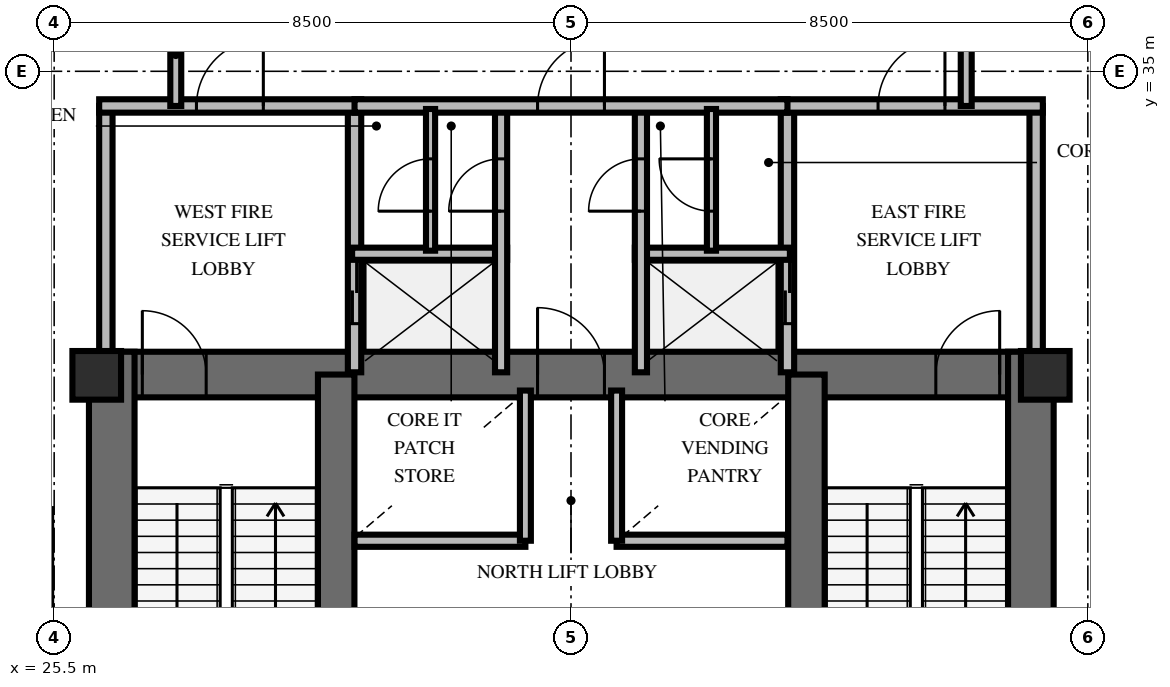
"""IFC4 building model, lengths in metres.
Left out: names, types, materials, properties, quantities, classifications, styles, units other than length and angle.
Written with IfcOpenShell. Run it as: python <this file> out.ifc"""

import sys

from ifc_helpers import new_model, si_unit, direction, frame, frame_2d, origin, origin_2d, place, context, subcontext, project, spatial, rectangle, extrude, element, fill, save


model = new_model("IFC4")
c1 = context("Model", 3, precision=1e-05, world=origin(), true_north=direction((0.0, 1.0)))
c2 = subcontext(c1, "Body", "Model", "MODEL_VIEW")
j1 = project(units=[si_unit("LENGTHUNIT", "METRE"), si_unit("PLANEANGLEUNIT", "RADIAN")], contexts=[c1])
p1 = place(None, origin())
s1 = spatial("IfcSite", under=j1, at=p1, CompositionType="ELEMENT")
p2 = place(p1, origin())
s2 = spatial("IfcBuilding", under=s1, at=p2, CompositionType="ELEMENT")
p3 = place(p2, frame((0.0, 0.0, 125.8)))
s3 = spatial("IfcBuildingStorey", under=s2, at=p3, CompositionType="ELEMENT", Elevation=125.8)
p4 = place(p3, frame((26.072, 30.013, 0.0), z_axis=(0.0, 0.0, 1.0), x_axis=(1.0, 0.0, 0.0)))
e1 = element("IfcWall", 1, at=p4, inside=s3, PredefinedType="SHEAR", context=c2, shape_type="SweptSolid", body=[
    extrude(rectangle(XDim=15.866, YDim=0.75, at=frame_2d((7.933, 0.0))), origin(), (0.0, 0.0, 1.0), 4.0),
])
p5 = place(p4, frame((0.878, 0.0, 0.0)))
e2 = element("IfcOpeningElement", 2, at=p5, cuts=e1, PredefinedType="OPENING", context=c2, shape_type="SweptSolid", body=[
    extrude(rectangle(XDim=1.05, YDim=2.15, at=frame_2d((0.525, 1.075))), frame((0.0, 0.385, 0.0), z_axis=(0.0, -1.0, 0.0), x_axis=(1.0, 0.0, 0.0)), (0.0, 0.0, 1.0), 0.77),
])
p6 = place(p4, frame((13.928, 0.0, 0.0)))
e3 = element("IfcOpeningElement", 3, at=p6, cuts=e1, PredefinedType="OPENING", context=c2, shape_type="SweptSolid", body=[
    extrude(rectangle(XDim=1.05, YDim=2.15, at=frame_2d((0.525, 1.075))), frame((0.0, 0.385, 0.0), z_axis=(0.0, -1.0, 0.0), x_axis=(1.0, 0.0, 0.0)), (0.0, 0.0, 1.0), 0.77),
])
p7 = place(p4, frame((7.378, 0.0, 0.0)))
e4 = element("IfcOpeningElement", 4, at=p7, cuts=e1, PredefinedType="OPENING", context=c2, shape_type="SweptSolid", body=[
    extrude(rectangle(XDim=1.1, YDim=2.15, at=frame_2d((0.55, 1.075))), frame((0.0, 0.385, 0.0), z_axis=(0.0, -1.0, 0.0), x_axis=(1.0, 0.0, 0.0)), (0.0, 0.0, 1.0), 0.77),
])
for number, where, z_axis, x_axis in (
    (5, (26.447, 19.812, 0.0), (0.0, 0.0, 1.0), (0.0, 1.0, 0.0)),
    (6, (41.563, 19.812, 0.0), (0.0, 0.0, 1.0), (0.0, 1.0, 0.0)),
):
    element("IfcWall", number, at=place(p3, frame(where, z_axis=z_axis, x_axis=x_axis)), inside=s3, PredefinedType="SHEAR", context=c2, shape_type="SweptSolid", body=[
        extrude(rectangle(XDim=10.576, YDim=0.75, at=frame_2d((5.288, 0.0))), origin(), (0.0, 0.0, 1.0), 4.0),
    ])
for number, where, z_axis, x_axis in (
    (7, (30.138, 20.187, 0.0), (0.0, 0.0, 1.0), (0.0, 1.0, 0.0)),
    (8, (37.872, 20.187, 0.0), (0.0, 0.0, 1.0), (0.0, 1.0, 0.0)),
):
    element("IfcWall", number, at=place(p3, frame(where, z_axis=z_axis, x_axis=x_axis)), inside=s3, PredefinedType="SHEAR", context=c2, shape_type="SweptSolid", body=[
        extrude(rectangle(XDim=9.826, YDim=0.6, at=frame_2d((4.913, 0.0))), origin(), (0.0, 0.0, 1.0), 4.0),
    ])
for number, where, z_axis, x_axis in (
    (9, (26.2, 30.0, 0.0), (0.0, 0.0, 1.0), (1.0, 0.0, 0.0)),
    (10, (41.8, 30.0, 0.0), (0.0, 0.0, 1.0), (1.0, 0.0, 0.0)),
):
    element("IfcColumn", number, at=place(p3, frame(where, z_axis=z_axis, x_axis=x_axis)), inside=s3, PredefinedType="PILASTER", context=c2, shape_type="SweptSolid", body=[
        extrude(rectangle(XDim=0.8, YDim=0.8, at=origin_2d()), origin(), (0.0, 0.0, 1.0), 4.0),
    ])
p8 = place(p3, frame((26.35, 30.05, 0.0), z_axis=(0.0, 0.0, 1.0), x_axis=(0.0, 1.0, 0.0)))
e11 = element("IfcWall", 11, at=p8, inside=s3, PredefinedType="SOLIDWALL", context=c2, shape_type="SweptSolid", body=[
    extrude(rectangle(XDim=4.38, YDim=0.22, at=frame_2d((2.19, 0.0))), origin(), (0.0, 0.0, 1.0), 2.8),
])
p9 = place(p3, frame((30.44, 30.05, 0.0), z_axis=(0.0, 0.0, 1.0), x_axis=(0.0, 1.0, 0.0)))
e12 = element("IfcWall", 12, at=p9, inside=s3, PredefinedType="SOLIDWALL", context=c2, shape_type="SweptSolid", body=[
    extrude(rectangle(XDim=4.38, YDim=0.22, at=frame_2d((2.19, 0.0))), origin(), (0.0, 0.0, 1.0), 2.8),
])
p10 = place(p9, frame((0.8, 0.0, 0.0)))
e13 = element("IfcOpeningElement", 13, at=p10, cuts=e12, PredefinedType="OPENING", context=c2, shape_type="SweptSolid", body=[
    extrude(rectangle(XDim=1.05, YDim=2.1, at=frame_2d((0.525, 1.05))), frame((0.0, 0.12, 0.0), z_axis=(0.0, -1.0, 0.0), x_axis=(1.0, 0.0, 0.0)), (0.0, 0.0, 1.0), 0.24),
])
p11 = place(p3, frame((26.24, 34.43, 0.0), z_axis=(0.0, 0.0, 1.0), x_axis=(1.0, 0.0, 0.0)))
e14 = element("IfcWall", 14, at=p11, inside=s3, PredefinedType="SOLIDWALL", context=c2, shape_type="SweptSolid", body=[
    extrude(rectangle(XDim=4.31, YDim=0.22, at=frame_2d((2.155, 0.0))), origin(), (0.0, 0.0, 1.0), 2.8),
])
p12 = place(p11, frame((1.6, 0.0, 0.0)))
e15 = element("IfcOpeningElement", 15, at=p12, cuts=e14, PredefinedType="OPENING", context=c2, shape_type="SweptSolid", body=[
    extrude(rectangle(XDim=1.1, YDim=2.15, at=frame_2d((0.55, 1.075))), frame((0.0, 0.12, 0.0), z_axis=(0.0, -1.0, 0.0), x_axis=(1.0, 0.0, 0.0)), (0.0, 0.0, 1.0), 0.24),
])
p13 = place(p3, frame((30.4, 32.0, 0.0), z_axis=(0.0, 0.0, 1.0), x_axis=(1.0, 0.0, 0.0)))
e16 = element("IfcWall", 16, at=p13, inside=s3, PredefinedType="SOLIDWALL", context=c2, shape_type="SweptSolid", body=[
    extrude(rectangle(XDim=2.55, YDim=0.2, at=frame_2d((1.275, 0.0))), origin(), (0.0, 0.0, 1.0), 2.8),
])
p14 = place(p3, frame((32.85, 30.05, 0.0), z_axis=(0.0, 0.0, 1.0), x_axis=(0.0, 1.0, 0.0)))
e17 = element("IfcWall", 17, at=p14, inside=s3, PredefinedType="SOLIDWALL", context=c2, shape_type="SweptSolid", body=[
    extrude(rectangle(XDim=4.38, YDim=0.2, at=frame_2d((2.19, 0.0))), origin(), (0.0, 0.0, 1.0), 2.8),
])
p15 = place(p14, frame((2.65, 0.0, 0.0)))
e18 = element("IfcOpeningElement", 18, at=p15, cuts=e17, PredefinedType="OPENING", context=c2, shape_type="SweptSolid", body=[
    extrude(rectangle(XDim=0.86, YDim=2.05, at=frame_2d((0.43, 1.025))), frame((0.0, 0.11, 0.0), z_axis=(0.0, -1.0, 0.0), x_axis=(1.0, 0.0, 0.0)), (0.0, 0.0, 1.0), 0.22),
])
p16 = place(p3, frame((37.56, 30.05, 0.0), z_axis=(0.0, 0.0, 1.0), x_axis=(0.0, 1.0, 0.0)))
e19 = element("IfcWall", 19, at=p16, inside=s3, PredefinedType="SOLIDWALL", context=c2, shape_type="SweptSolid", body=[
    extrude(rectangle(XDim=4.38, YDim=0.22, at=frame_2d((2.19, 0.0))), origin(), (0.0, 0.0, 1.0), 2.8),
])
p17 = place(p16, frame((0.8, 0.0, 0.0)))
e20 = element("IfcOpeningElement", 20, at=p17, cuts=e19, PredefinedType="OPENING", context=c2, shape_type="SweptSolid", body=[
    extrude(rectangle(XDim=1.05, YDim=2.1, at=frame_2d((0.525, 1.05))), frame((0.0, 0.12, 0.0), z_axis=(0.0, -1.0, 0.0), x_axis=(1.0, 0.0, 0.0)), (0.0, 0.0, 1.0), 0.24),
])
p18 = place(p3, frame((41.65, 30.05, 0.0), z_axis=(0.0, 0.0, 1.0), x_axis=(0.0, 1.0, 0.0)))
e21 = element("IfcWall", 21, at=p18, inside=s3, PredefinedType="SOLIDWALL", context=c2, shape_type="SweptSolid", body=[
    extrude(rectangle(XDim=4.38, YDim=0.22, at=frame_2d((2.19, 0.0))), origin(), (0.0, 0.0, 1.0), 2.8),
])
p19 = place(p3, frame((37.45, 34.43, 0.0), z_axis=(0.0, 0.0, 1.0), x_axis=(1.0, 0.0, 0.0)))
e22 = element("IfcWall", 22, at=p19, inside=s3, PredefinedType="SOLIDWALL", context=c2, shape_type="SweptSolid", body=[
    extrude(rectangle(XDim=4.31, YDim=0.22, at=frame_2d((2.155, 0.0))), origin(), (0.0, 0.0, 1.0), 2.8),
])
p20 = place(p19, frame((1.6, 0.0, 0.0)))
e23 = element("IfcOpeningElement", 23, at=p20, cuts=e22, PredefinedType="OPENING", context=c2, shape_type="SweptSolid", body=[
    extrude(rectangle(XDim=1.1, YDim=2.15, at=frame_2d((0.55, 1.075))), frame((0.0, 0.12, 0.0), z_axis=(0.0, -1.0, 0.0), x_axis=(1.0, 0.0, 0.0)), (0.0, 0.0, 1.0), 0.24),
])
p21 = place(p3, frame((35.05, 32.0, 0.0), z_axis=(0.0, 0.0, 1.0), x_axis=(1.0, 0.0, 0.0)))
e24 = element("IfcWall", 24, at=p21, inside=s3, PredefinedType="SOLIDWALL", context=c2, shape_type="SweptSolid", body=[
    extrude(rectangle(XDim=2.55, YDim=0.2, at=frame_2d((1.275, 0.0))), origin(), (0.0, 0.0, 1.0), 2.8),
])
p22 = place(p3, frame((35.15, 30.05, 0.0), z_axis=(0.0, 0.0, 1.0), x_axis=(0.0, 1.0, 0.0)))
e25 = element("IfcWall", 25, at=p22, inside=s3, PredefinedType="SOLIDWALL", context=c2, shape_type="SweptSolid", body=[
    extrude(rectangle(XDim=4.38, YDim=0.2, at=frame_2d((2.19, 0.0))), origin(), (0.0, 0.0, 1.0), 2.8),
])
p23 = place(p22, frame((2.65, 0.0, 0.0)))
e26 = element("IfcOpeningElement", 26, at=p23, cuts=e25, PredefinedType="OPENING", context=c2, shape_type="SweptSolid", body=[
    extrude(rectangle(XDim=0.86, YDim=2.05, at=frame_2d((0.43, 1.025))), frame((0.0, 0.11, 0.0), z_axis=(0.0, -1.0, 0.0), x_axis=(1.0, 0.0, 0.0)), (0.0, 0.0, 1.0), 0.22),
])
p24 = place(p3, frame((30.44, 34.43, 0.0), z_axis=(0.0, 0.0, 1.0), x_axis=(1.0, 0.0, 0.0)))
e27 = element("IfcWall", 27, at=p24, inside=s3, PredefinedType="SOLIDWALL", context=c2, shape_type="SweptSolid", body=[
    extrude(rectangle(XDim=7.12, YDim=0.22, at=frame_2d((3.56, 0.0))), origin(), (0.0, 0.0, 1.0), 2.8),
])
p25 = place(p24, frame((3.01, 0.0, 0.0)))
e28 = element("IfcOpeningElement", 28, at=p25, cuts=e27, PredefinedType="OPENING", context=c2, shape_type="SweptSolid", body=[
    extrude(rectangle(XDim=1.1, YDim=2.15, at=frame_2d((0.55, 1.075))), frame((0.0, 0.12, 0.0), z_axis=(0.0, -1.0, 0.0), x_axis=(1.0, 0.0, 0.0)), (0.0, 0.0, 1.0), 0.24),
])
p26 = place(p3, frame((31.69, 32.05, 0.0), z_axis=(0.0, 0.0, 1.0), x_axis=(0.0, 1.0, 0.0)))
e29 = element("IfcWall", 29, at=p26, inside=s3, PredefinedType="PARTITIONING", context=c2, shape_type="SweptSolid", body=[
    extrude(rectangle(XDim=2.33, YDim=0.15, at=frame_2d((1.165, 0.0))), origin(), (0.0, 0.0, 1.0), 2.8),
])
p27 = place(p26, frame((0.65, 0.0, 0.0)))
e30 = element("IfcOpeningElement", 30, at=p27, cuts=e29, PredefinedType="OPENING", context=c2, shape_type="SweptSolid", body=[
    extrude(rectangle(XDim=0.86, YDim=2.05, at=frame_2d((0.43, 1.025))), frame((0.0, 0.085, 0.0), z_axis=(0.0, -1.0, 0.0), x_axis=(1.0, 0.0, 0.0)), (0.0, 0.0, 1.0), 0.17),
])
p28 = place(p3, frame((36.31, 32.05, 0.0), z_axis=(0.0, 0.0, 1.0), x_axis=(0.0, 1.0, 0.0)))
e31 = element("IfcWall", 31, at=p28, inside=s3, PredefinedType="PARTITIONING", context=c2, shape_type="SweptSolid", body=[
    extrude(rectangle(XDim=2.33, YDim=0.15, at=frame_2d((1.165, 0.0))), origin(), (0.0, 0.0, 1.0), 2.8),
])
p29 = place(p28, frame((0.65, 0.0, 0.0)))
e32 = element("IfcOpeningElement", 32, at=p29, cuts=e31, PredefinedType="OPENING", context=c2, shape_type="SweptSolid", body=[
    extrude(rectangle(XDim=0.86, YDim=2.05, at=frame_2d((0.43, 1.025))), frame((0.0, 0.085, 0.0), z_axis=(0.0, -1.0, 0.0), x_axis=(1.0, 0.0, 0.0)), (0.0, 0.0, 1.0), 0.17),
])
p30 = place(p3, frame((30.44, 27.28, 0.0), z_axis=(0.0, 0.0, 1.0), x_axis=(1.0, 0.0, 0.0)))
e33 = element("IfcWall", 33, at=p30, inside=s3, PredefinedType="SOLIDWALL", context=c2, shape_type="SweptSolid", body=[
    extrude(rectangle(XDim=2.81, YDim=0.2, at=frame_2d((1.405, 0.0))), origin(), (0.0, 0.0, 1.0), 2.8),
])
p31 = place(p3, frame((33.25, 27.28, 0.0), z_axis=(0.0, 0.0, 1.0), x_axis=(0.0, 1.0, 0.0)))
e34 = element("IfcWall", 34, at=p31, inside=s3, PredefinedType="SOLIDWALL", context=c2, shape_type="SweptSolid", body=[
    extrude(rectangle(XDim=2.47, YDim=0.18, at=frame_2d((1.235, 0.0))), origin(), (0.0, 0.0, 1.0), 2.8),
])
p32 = place(p3, frame((34.75, 27.28, 0.0), z_axis=(0.0, 0.0, 1.0), x_axis=(1.0, 0.0, 0.0)))
e35 = element("IfcWall", 35, at=p32, inside=s3, PredefinedType="SOLIDWALL", context=c2, shape_type="SweptSolid", body=[
    extrude(rectangle(XDim=2.81, YDim=0.2, at=frame_2d((1.405, 0.0))), origin(), (0.0, 0.0, 1.0), 2.8),
])
p33 = place(p3, frame((34.75, 27.28, 0.0), z_axis=(0.0, 0.0, 1.0), x_axis=(0.0, 1.0, 0.0)))
e36 = element("IfcWall", 36, at=p33, inside=s3, PredefinedType="SOLIDWALL", context=c2, shape_type="SweptSolid", body=[
    extrude(rectangle(XDim=2.47, YDim=0.18, at=frame_2d((1.235, 0.0))), origin(), (0.0, 0.0, 1.0), 2.8),
])
for number, where, z_axis, x_axis in (
    (37, (27.5, 34.43, 0.0), (0.0, 0.0, 1.0), (0.0, 1.0, 0.0)),
    (38, (40.5, 36.123, 0.0), (0.0, 0.0, 1.0), (0.0, -1.0, 0.0)),
):
    element("IfcWall", number, at=place(p3, frame(where, z_axis=z_axis, x_axis=x_axis)), inside=s3, PredefinedType="PARTITIONING", context=c2, shape_type="SweptSolid", body=[
        extrude(rectangle(XDim=1.693, YDim=0.18, at=frame_2d((0.846, 0.0))), origin(), (0.0, 0.0, 1.0), 2.8),
    ])
p34 = place(p3, frame((44.369, 35.287, 0.0), z_axis=(0.0, 0.0, 1.0), x_axis=(-0.786395437725, 0.617723413451, 0.0)))
e39 = element("IfcWall", 39, at=p34, inside=s3, PredefinedType="PARTITIONING", context=c2, shape_type="SweptSolid", body=[
    extrude(rectangle(XDim=4.834, YDim=0.18, at=frame_2d((2.417, 0.0))), origin(), (0.0, 0.0, 1.0), 2.8),
])
p35 = place(p34, frame((1.034, 0.0, 0.0)))
e40 = element("IfcOpeningElement", 40, at=p35, cuts=e39, PredefinedType="OPENING", context=c2, shape_type="SweptSolid", body=[
    extrude(rectangle(XDim=1.0, YDim=2.15, at=frame_2d((0.5, 1.075))), frame((0.0, 0.1, 0.0), z_axis=(0.0, -1.0, 0.0), x_axis=(1.0, 0.0, 0.0)), (0.0, 0.0, 1.0), 0.2),
])
p36 = place(p3, frame((26.655, 37.824, 0.0), z_axis=(0.0, 0.0, 1.0), x_axis=(-0.744874027172, -0.66720512861, 0.0)))
e41 = element("IfcWall", 41, at=p36, inside=s3, PredefinedType="PARTITIONING", context=c2, shape_type="SweptSolid", body=[
    extrude(rectangle(XDim=4.834, YDim=0.18, at=frame_2d((2.417, 0.0))), origin(), (0.0, 0.0, 1.0), 2.8),
])
p37 = place(p5, origin())
e42 = element("IfcDoor", 42, at=p37, inside=s3, OperationType="SINGLE_SWING_LEFT", PredefinedType="DOOR", context=c2, shape_type="SweptSolid", body=[
    extrude(rectangle(XDim=1.05, YDim=2.15, at=frame_2d((0.525, 1.075))), frame((0.0, 0.025, 0.0), z_axis=(0.0, -1.0, 0.0), x_axis=(1.0, 0.0, 0.0)), (0.0, 0.0, 1.0), 0.05),
])
fill(e2, e42)
p38 = place(p6, origin())
e43 = element("IfcDoor", 43, at=p38, inside=s3, OperationType="SINGLE_SWING_RIGHT", PredefinedType="DOOR", context=c2, shape_type="SweptSolid", body=[
    extrude(rectangle(XDim=1.05, YDim=2.15, at=frame_2d((0.525, 1.075))), frame((0.0, 0.025, 0.0), z_axis=(0.0, -1.0, 0.0), x_axis=(1.0, 0.0, 0.0)), (0.0, 0.0, 1.0), 0.05),
])
fill(e3, e43)
p39 = place(p7, origin())
e44 = element("IfcDoor", 44, at=p39, inside=s3, OperationType="SINGLE_SWING_LEFT", PredefinedType="DOOR", context=c2, shape_type="SweptSolid", body=[
    extrude(rectangle(XDim=1.1, YDim=2.15, at=frame_2d((0.55, 1.075))), frame((0.0, 0.025, 0.0), z_axis=(0.0, -1.0, 0.0), x_axis=(1.0, 0.0, 0.0)), (0.0, 0.0, 1.0), 0.05),
])
fill(e4, e44)
p40 = place(p12, origin())
e45 = element("IfcDoor", 45, at=p40, inside=s3, OperationType="SINGLE_SWING_RIGHT", PredefinedType="DOOR", context=c2, shape_type="SweptSolid", body=[
    extrude(rectangle(XDim=1.1, YDim=2.15, at=frame_2d((0.55, 1.075))), frame((0.0, 0.025, 0.0), z_axis=(0.0, -1.0, 0.0), x_axis=(1.0, 0.0, 0.0)), (0.0, 0.0, 1.0), 0.05),
])
fill(e15, e45)
p41 = place(p10, origin())
e46 = element("IfcDoor", 46, at=p41, inside=s3, OperationType="DOUBLE_DOOR_SLIDING", PredefinedType="USERDEFINED", context=c2, shape_type="SweptSolid", body=[
    extrude(rectangle(XDim=1.05, YDim=2.1, at=frame_2d((0.525, 1.05))), frame((0.0, 0.025, 0.0), z_axis=(0.0, -1.0, 0.0), x_axis=(1.0, 0.0, 0.0)), (0.0, 0.0, 1.0), 0.05),
])
fill(e13, e46)
p42 = place(p15, origin())
e47 = element("IfcDoor", 47, at=p42, inside=s3, OperationType="SINGLE_SWING_LEFT", PredefinedType="TRAPDOOR", context=c2, shape_type="SweptSolid", body=[
    extrude(rectangle(XDim=0.86, YDim=2.05, at=frame_2d((0.43, 1.025))), frame((0.0, 0.025, 0.0), z_axis=(0.0, -1.0, 0.0), x_axis=(1.0, 0.0, 0.0)), (0.0, 0.0, 1.0), 0.05),
])
fill(e18, e47)
p43 = place(p20, origin())
e48 = element("IfcDoor", 48, at=p43, inside=s3, OperationType="SINGLE_SWING_RIGHT", PredefinedType="DOOR", context=c2, shape_type="SweptSolid", body=[
    extrude(rectangle(XDim=1.1, YDim=2.15, at=frame_2d((0.55, 1.075))), frame((0.0, 0.025, 0.0), z_axis=(0.0, -1.0, 0.0), x_axis=(1.0, 0.0, 0.0)), (0.0, 0.0, 1.0), 0.05),
])
fill(e23, e48)
p44 = place(p17, origin())
e49 = element("IfcDoor", 49, at=p44, inside=s3, OperationType="DOUBLE_DOOR_SLIDING", PredefinedType="USERDEFINED", context=c2, shape_type="SweptSolid", body=[
    extrude(rectangle(XDim=1.05, YDim=2.1, at=frame_2d((0.525, 1.05))), frame((0.0, 0.025, 0.0), z_axis=(0.0, -1.0, 0.0), x_axis=(1.0, 0.0, 0.0)), (0.0, 0.0, 1.0), 0.05),
])
fill(e20, e49)
p45 = place(p23, origin())
e50 = element("IfcDoor", 50, at=p45, inside=s3, OperationType="SINGLE_SWING_LEFT", PredefinedType="TRAPDOOR", context=c2, shape_type="SweptSolid", body=[
    extrude(rectangle(XDim=0.86, YDim=2.05, at=frame_2d((0.43, 1.025))), frame((0.0, 0.025, 0.0), z_axis=(0.0, -1.0, 0.0), x_axis=(1.0, 0.0, 0.0)), (0.0, 0.0, 1.0), 0.05),
])
fill(e26, e50)
p46 = place(p25, origin())
e51 = element("IfcDoor", 51, at=p46, inside=s3, OperationType="SINGLE_SWING_RIGHT", PredefinedType="DOOR", context=c2, shape_type="SweptSolid", body=[
    extrude(rectangle(XDim=1.1, YDim=2.15, at=frame_2d((0.55, 1.075))), frame((0.0, 0.025, 0.0), z_axis=(0.0, -1.0, 0.0), x_axis=(1.0, 0.0, 0.0)), (0.0, 0.0, 1.0), 0.05),
])
fill(e28, e51)
p47 = place(p27, origin())
e52 = element("IfcDoor", 52, at=p47, inside=s3, OperationType="SINGLE_SWING_LEFT", PredefinedType="TRAPDOOR", context=c2, shape_type="SweptSolid", body=[
    extrude(rectangle(XDim=0.86, YDim=2.05, at=frame_2d((0.43, 1.025))), frame((0.0, 0.025, 0.0), z_axis=(0.0, -1.0, 0.0), x_axis=(1.0, 0.0, 0.0)), (0.0, 0.0, 1.0), 0.05),
])
fill(e30, e52)
p48 = place(p29, origin())
e53 = element("IfcDoor", 53, at=p48, inside=s3, OperationType="SINGLE_SWING_RIGHT", PredefinedType="TRAPDOOR", context=c2, shape_type="SweptSolid", body=[
    extrude(rectangle(XDim=0.86, YDim=2.05, at=frame_2d((0.43, 1.025))), frame((0.0, 0.025, 0.0), z_axis=(0.0, -1.0, 0.0), x_axis=(1.0, 0.0, 0.0)), (0.0, 0.0, 1.0), 0.05),
])
fill(e32, e53)
save(model, sys.argv[1])
